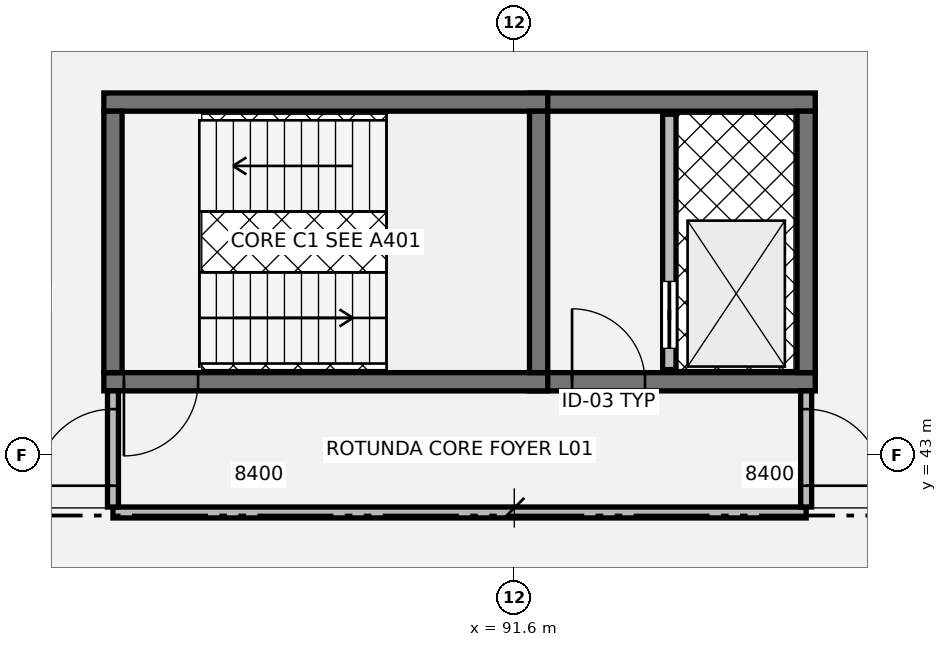
"""IFC4 building model, lengths in metres.
Left out: names, types, materials, properties, quantities, classifications, styles, units other than length and angle.
Written with IfcOpenShell. Run it as: python <this file> out.ifc"""

import sys

from ifc_helpers import new_model, si_unit, direction, frame, frame_2d, origin, place, context, subcontext, project, spatial, rectangle, circle, extrude, element, fill, save


model = new_model("IFC4")
c1 = context("Model", 3, precision=1e-05, world=origin(), true_north=direction((0.0, 1.0)))
c2 = subcontext(c1, "Body", "Model", "MODEL_VIEW")
j1 = project(units=[si_unit("LENGTHUNIT", "METRE"), si_unit("PLANEANGLEUNIT", "RADIAN")], contexts=[c1])
p1 = place(None, origin())
s1 = spatial("IfcSite", under=j1, at=p1, CompositionType="ELEMENT")
p2 = place(p1, origin())
s2 = spatial("IfcBuilding", under=s1, at=p2, CompositionType="ELEMENT")
p3 = place(p2, frame((0.0, 0.0, 5.1)))
s3 = spatial("IfcBuildingStorey", under=s2, at=p3, CompositionType="ELEMENT", Elevation=5.1)
p4 = place(p3, frame((85.271, 50.658, 0.0), z_axis=(0.0, 0.0, 1.0), x_axis=(-0.897210232885, -0.441603666205, 0.0)))
e1 = element("IfcWall", 1, at=p4, inside=s3, PredefinedType="SOLIDWALL", context=c2, shape_type="SweptSolid", body=[
    extrude(rectangle(XDim=2.145, YDim=0.295, at=frame_2d((1.072, 0.0))), origin(), (0.0, 0.0, 1.0), 3.855),
])
p5 = place(p4, frame((0.352, 0.0, 0.25)))
e2 = element("IfcOpeningElement", 2, at=p5, cuts=e1, PredefinedType="OPENING", context=c2, shape_type="SweptSolid", body=[
    extrude(circle(Radius=0.72, at=frame_2d((0.72, 0.72))), frame((0.0, 0.157, 0.0), z_axis=(0.0, -1.0, 0.0), x_axis=(1.0, 0.0, 0.0)), (0.0, 0.0, 1.0), 0.315),
])
p6 = place(p4, frame((0.352, 0.0, 2.03)))
e3 = element("IfcOpeningElement", 3, at=p6, cuts=e1, PredefinedType="OPENING", context=c2, shape_type="SweptSolid", body=[
    extrude(circle(Radius=0.72, at=frame_2d((0.72, 0.72))), frame((0.0, 0.157, 0.0), z_axis=(0.0, -1.0, 0.0), x_axis=(1.0, 0.0, 0.0)), (0.0, 0.0, 1.0), 0.315),
])
p7 = place(p3, frame((91.85, 44.2, 0.0), z_axis=(0.0, 0.0, 1.0), x_axis=(1.0, 0.0, 0.0)))
e4 = element("IfcWall", 4, at=p7, inside=s3, PredefinedType="SHEAR", context=c2, shape_type="SweptSolid", body=[
    extrude(rectangle(XDim=4.7, YDim=0.3, at=frame_2d((2.35, 0.0))), origin(), (0.0, 0.0, 1.0), 3.845),
])
p8 = place(p7, frame((0.7, 0.0, 0.0)))
e5 = element("IfcOpeningElement", 5, at=p8, cuts=e4, PredefinedType="OPENING", context=c2, shape_type="SweptSolid", body=[
    extrude(rectangle(XDim=1.2, YDim=2.16, at=frame_2d((0.6, 1.08))), frame((0.0, 0.16, 0.0), z_axis=(0.0, -1.0, 0.0), x_axis=(1.0, 0.0, 0.0)), (0.0, 0.0, 1.0), 0.32),
])
p9 = place(p3, frame((96.55, 48.8, 0.0), z_axis=(0.0, 0.0, 1.0), x_axis=(-1.0, 0.0, 0.0)))
e6 = element("IfcWall", 6, at=p9, inside=s3, PredefinedType="SHEAR", context=c2, shape_type="SweptSolid", body=[
    extrude(rectangle(XDim=4.7, YDim=0.3, at=frame_2d((2.35, 0.0))), origin(), (0.0, 0.0, 1.0), 3.845),
])
p10 = place(p3, frame((96.4, 44.35, 0.0), z_axis=(0.0, 0.0, 1.0), x_axis=(0.0, 1.0, 0.0)))
e7 = element("IfcWall", 7, at=p10, inside=s3, PredefinedType="SHEAR", context=c2, shape_type="SweptSolid", body=[
    extrude(rectangle(XDim=4.3, YDim=0.3, at=frame_2d((2.15, 0.0))), origin(), (0.0, 0.0, 1.0), 3.845),
])
p11 = place(p3, frame((94.15, 44.4, 0.0), z_axis=(0.0, 0.0, 1.0), x_axis=(0.0, 1.0, 0.0)))
e8 = element("IfcWall", 8, at=p11, inside=s3, PredefinedType="SOLIDWALL", context=c2, shape_type="SweptSolid", body=[
    extrude(rectangle(XDim=4.2, YDim=0.22, at=frame_2d((2.1, 0.0))), origin(), (0.0, 0.0, 1.0), 3.845),
])
p12 = place(p11, frame((0.35, 0.0, 0.0)))
e9 = element("IfcOpeningElement", 9, at=p12, cuts=e8, PredefinedType="OPENING", context=c2, shape_type="SweptSolid", body=[
    extrude(rectangle(XDim=1.1, YDim=2.15, at=frame_2d((0.55, 1.075))), frame((0.0, 0.12, 0.0), z_axis=(0.0, -1.0, 0.0), x_axis=(1.0, 0.0, 0.0)), (0.0, 0.0, 1.0), 0.24),
])
p13 = place(p3, frame((84.85, 44.2, 0.0), z_axis=(0.0, 0.0, 1.0), x_axis=(1.0, 0.0, 0.0)))
e10 = element("IfcWall", 10, at=p13, inside=s3, PredefinedType="SHEAR", context=c2, shape_type="SweptSolid", body=[
    extrude(rectangle(XDim=7.3, YDim=0.3, at=frame_2d((3.65, 0.0))), origin(), (0.0, 0.0, 1.0), 3.845),
])
p14 = place(p13, frame((0.33, 0.0, 0.0)))
e11 = element("IfcOpeningElement", 11, at=p14, cuts=e10, PredefinedType="OPENING", context=c2, shape_type="SweptSolid", body=[
    extrude(rectangle(XDim=1.22, YDim=2.18, at=frame_2d((0.61, 1.09))), frame((0.0, 0.16, 0.0), z_axis=(0.0, -1.0, 0.0), x_axis=(1.0, 0.0, 0.0)), (0.0, 0.0, 1.0), 0.32),
])
p15 = place(p3, frame((84.85, 48.8, 0.0), z_axis=(0.0, 0.0, 1.0), x_axis=(1.0, 0.0, 0.0)))
e12 = element("IfcWall", 12, at=p15, inside=s3, PredefinedType="SHEAR", context=c2, shape_type="SweptSolid", body=[
    extrude(rectangle(XDim=7.3, YDim=0.3, at=frame_2d((3.65, 0.0))), origin(), (0.0, 0.0, 1.0), 3.845),
])
for number, where, z_axis, x_axis in (
    (13, (85.0, 44.35, 0.0), (0.0, 0.0, 1.0), (0.0, 1.0, 0.0)),
    (14, (92.0, 44.35, 0.0), (0.0, 0.0, 1.0), (0.0, 1.0, 0.0)),
):
    element("IfcWall", number, at=place(p3, frame(where, z_axis=z_axis, x_axis=x_axis)), inside=s3, PredefinedType="SHEAR", context=c2, shape_type="SweptSolid", body=[
        extrude(rectangle(XDim=4.3, YDim=0.3, at=frame_2d((2.15, 0.0))), origin(), (0.0, 0.0, 1.0), 3.845),
    ])
p16 = place(p3, frame((85.0, 42.05, 0.0), z_axis=(0.0, 0.0, 1.0), x_axis=(1.0, 0.0, 0.0)))
e15 = element("IfcWall", 15, at=p16, inside=s3, PredefinedType="PARTITIONING", context=c2, shape_type="SweptSolid", body=[
    extrude(rectangle(XDim=11.4, YDim=0.18, at=frame_2d((5.7, 0.0))), origin(), (0.0, 0.0, 1.0), 3.23),
])
p17 = place(p3, frame((85.0, 42.14, 0.0), z_axis=(0.0, 0.0, 1.0), x_axis=(0.0, 1.0, 0.0)))
e16 = element("IfcWall", 16, at=p17, inside=s3, PredefinedType="PARTITIONING", context=c2, shape_type="SweptSolid", body=[
    extrude(rectangle(XDim=1.91, YDim=0.18, at=frame_2d((0.955, 0.0))), origin(), (0.0, 0.0, 1.0), 3.23),
])
p18 = place(p17, frame((0.35, 0.0, 0.0)))
e17 = element("IfcOpeningElement", 17, at=p18, cuts=e16, PredefinedType="OPENING", context=c2, shape_type="SweptSolid", body=[
    extrude(rectangle(XDim=1.26, YDim=2.2, at=frame_2d((0.63, 1.1))), frame((0.0, 0.1, 0.0), z_axis=(0.0, -1.0, 0.0), x_axis=(1.0, 0.0, 0.0)), (0.0, 0.0, 1.0), 0.2),
])
p19 = place(p3, frame((96.4, 42.14, 0.0), z_axis=(0.0, 0.0, 1.0), x_axis=(0.0, 1.0, 0.0)))
e18 = element("IfcWall", 18, at=p19, inside=s3, PredefinedType="PARTITIONING", context=c2, shape_type="SweptSolid", body=[
    extrude(rectangle(XDim=1.91, YDim=0.18, at=frame_2d((0.955, 0.0))), origin(), (0.0, 0.0, 1.0), 3.23),
])
p20 = place(p19, frame((0.35, 0.0, 0.0)))
e19 = element("IfcOpeningElement", 19, at=p20, cuts=e18, PredefinedType="OPENING", context=c2, shape_type="SweptSolid", body=[
    extrude(rectangle(XDim=1.26, YDim=2.2, at=frame_2d((0.63, 1.1))), frame((0.0, 0.1, 0.0), z_axis=(0.0, -1.0, 0.0), x_axis=(1.0, 0.0, 0.0)), (0.0, 0.0, 1.0), 0.2),
])
p21 = place(p8, origin())
e20 = element("IfcDoor", 20, at=p21, inside=s3, OperationType="SINGLE_SWING_LEFT", PredefinedType="DOOR", context=c2, shape_type="SweptSolid", body=[
    extrude(rectangle(XDim=1.2, YDim=2.16, at=frame_2d((0.6, 1.08))), frame((0.0, 0.025, 0.0), z_axis=(0.0, -1.0, 0.0), x_axis=(1.0, 0.0, 0.0)), (0.0, 0.0, 1.0), 0.05),
])
fill(e5, e20)
p22 = place(p12, origin())
e21 = element("IfcDoor", 21, at=p22, inside=s3, OperationType="SLIDING_TO_LEFT", PredefinedType="DOOR", context=c2, shape_type="SweptSolid", body=[
    extrude(rectangle(XDim=1.1, YDim=2.15, at=frame_2d((0.55, 1.075))), frame((0.0, 0.025, 0.0), z_axis=(0.0, -1.0, 0.0), x_axis=(1.0, 0.0, 0.0)), (0.0, 0.0, 1.0), 0.05),
])
fill(e9, e21)
p23 = place(p14, origin())
e22 = element("IfcDoor", 22, at=p23, inside=s3, OperationType="SINGLE_SWING_RIGHT", PredefinedType="DOOR", context=c2, shape_type="SweptSolid", body=[
    extrude(rectangle(XDim=1.22, YDim=2.18, at=frame_2d((0.61, 1.09))), frame((0.0, 0.025, 0.0), z_axis=(0.0, -1.0, 0.0), x_axis=(1.0, 0.0, 0.0)), (0.0, 0.0, 1.0), 0.05),
])
fill(e11, e22)
p24 = place(p18, origin())
e23 = element("IfcDoor", 23, at=p24, inside=s3, OperationType="SINGLE_SWING_LEFT", PredefinedType="DOOR", context=c2, shape_type="SweptSolid", body=[
    extrude(rectangle(XDim=1.26, YDim=2.2, at=frame_2d((0.63, 1.1))), frame((0.0, 0.025, 0.0), z_axis=(0.0, -1.0, 0.0), x_axis=(1.0, 0.0, 0.0)), (0.0, 0.0, 1.0), 0.05),
])
fill(e17, e23)
p25 = place(p20, origin())
e24 = element("IfcDoor", 24, at=p25, inside=s3, OperationType="SINGLE_SWING_RIGHT", PredefinedType="DOOR", context=c2, shape_type="SweptSolid", body=[
    extrude(rectangle(XDim=1.26, YDim=2.2, at=frame_2d((0.63, 1.1))), frame((0.0, 0.025, 0.0), z_axis=(0.0, -1.0, 0.0), x_axis=(1.0, 0.0, 0.0)), (0.0, 0.0, 1.0), 0.05),
])
fill(e19, e24)
save(model, sys.argv[1])
